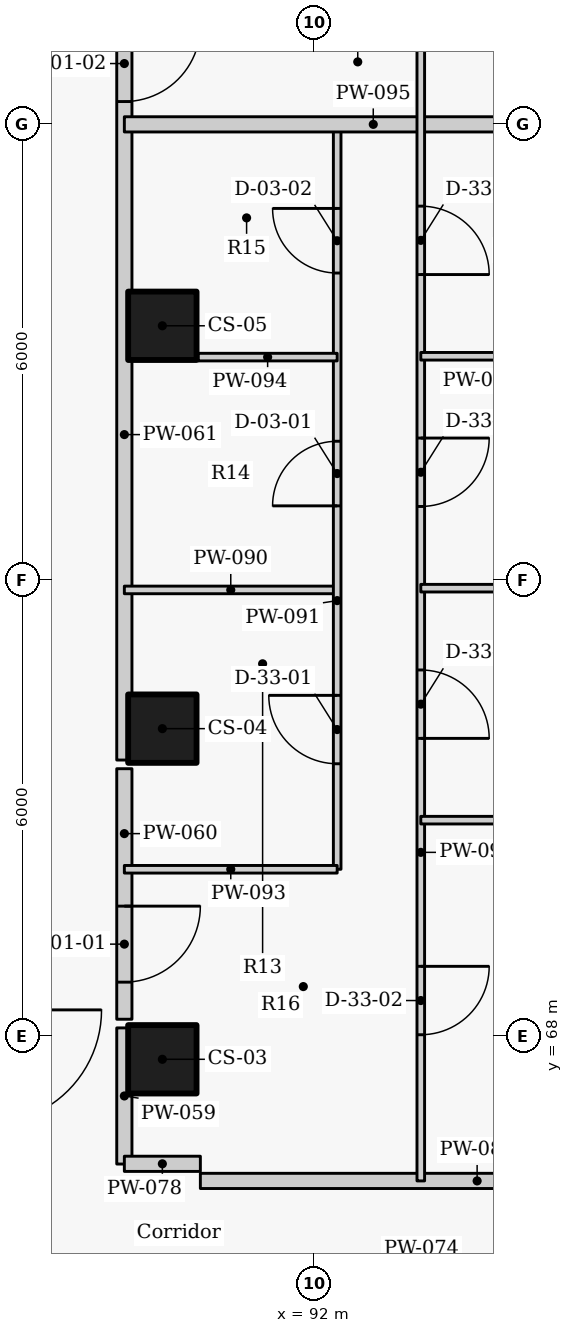
"""IFC4 building model, lengths in metres.
Left out: names, types, materials, properties, quantities, classifications, styles, units other than length and angle.
Written with IfcOpenShell. Run it as: python <this file> out.ifc"""

import sys

from ifc_helpers import new_model, si_unit, direction, frame, frame_2d, origin, origin_2d, place, context, subcontext, project, spatial, rectangle, extrude, element, fill, save


model = new_model("IFC4")
c1 = context("Model", 3, precision=1e-05, world=origin(), true_north=direction((0.0, 1.0)))
c2 = subcontext(c1, "Body", "Model", "MODEL_VIEW")
j1 = project(units=[si_unit("LENGTHUNIT", "METRE"), si_unit("PLANEANGLEUNIT", "RADIAN")], contexts=[c1])
p1 = place(None, origin())
s1 = spatial("IfcSite", under=j1, at=p1, CompositionType="ELEMENT")
p2 = place(p1, origin())
s2 = spatial("IfcBuilding", under=s1, at=p2, CompositionType="ELEMENT")
p3 = place(p2, frame((0.0, 0.0, 229.5)))
s3 = spatial("IfcBuildingStorey", under=s2, at=p3, CompositionType="ELEMENT", Elevation=229.5)
for number, where, z_axis, x_axis in (
    (1, (90.0, 67.7, 0.0), (0.0, 0.0, 1.0), (0.0, 1.0, 0.0)),
    (2, (90.0, 72.05, 0.0), (0.0, 0.0, 1.0), (0.0, 1.0, 0.0)),
    (3, (90.0, 77.35, 0.0), (0.0, 0.0, 1.0), (0.0, 1.0, 0.0)),
):
    element("IfcColumn", number, at=place(p3, frame(where, z_axis=z_axis, x_axis=x_axis)), inside=s3, PredefinedType="COLUMN", context=c2, shape_type="SweptSolid", body=[
        extrude(rectangle(XDim=0.9, YDim=0.9, at=origin_2d()), origin(), (0.0, 0.0, 1.0), 3.3),
    ])
p4 = place(p3, frame((89.5, 66.322, 0.0), z_axis=(0.0, 0.0, 1.0), x_axis=(0.0, 1.0, 0.0)))
e4 = element("IfcWall", 4, at=p4, inside=s3, PredefinedType="PARTITIONING", context=c2, shape_type="SweptSolid", body=[
    extrude(rectangle(XDim=1.791, YDim=0.2, at=frame_2d((0.896, 0.0))), origin(), (0.0, 0.0, 1.0), 3.025),
])
p5 = place(p3, frame((89.5, 71.523, 0.0), z_axis=(0.0, 0.0, 1.0), x_axis=(0.0, -1.0, 0.0)))
e5 = element("IfcWall", 5, at=p5, inside=s3, PredefinedType="PARTITIONING", context=c2, shape_type="SweptSolid", body=[
    extrude(rectangle(XDim=3.296, YDim=0.2, at=frame_2d((1.648, 0.0))), origin(), (0.0, 0.0, 1.0), 3.025),
])
p6 = place(p5, frame((1.808, 0.0, 0.0)))
e6 = element("IfcOpeningElement", 6, at=p6, cuts=e5, PredefinedType="OPENING", context=c2, shape_type="SweptSolid", body=[
    extrude(rectangle(XDim=1.0, YDim=2.1, at=frame_2d((0.5, 1.05))), frame((0.0, 0.11, 0.0), z_axis=(0.0, -1.0, 0.0), x_axis=(1.0, 0.0, 0.0)), (0.0, 0.0, 1.0), 0.22),
])
p7 = place(p3, frame((89.5, 82.123, 0.0), z_axis=(0.0, 0.0, 1.0), x_axis=(0.0, -1.0, 0.0)))
e7 = element("IfcWall", 7, at=p7, inside=s3, PredefinedType="PARTITIONING", context=c2, shape_type="SweptSolid", body=[
    extrude(rectangle(XDim=10.486, YDim=0.2, at=frame_2d((5.243, 0.0))), origin(), (0.0, 0.0, 1.0), 3.025),
])
p8 = place(p7, frame((0.823, 0.0, 0.0)))
e8 = element("IfcOpeningElement", 8, at=p8, cuts=e7, PredefinedType="OPENING", context=c2, shape_type="SweptSolid", body=[
    extrude(rectangle(XDim=1.0, YDim=2.1, at=frame_2d((0.5, 1.05))), frame((0.0, 0.11, 0.0), z_axis=(0.0, -1.0, 0.0), x_axis=(1.0, 0.0, 0.0)), (0.0, 0.0, 1.0), 0.22),
])
p9 = place(p3, frame((89.5, 66.325, 0.0), z_axis=(0.0, 0.0, 1.0), x_axis=(1.0, 0.0, 0.0)))
e9 = element("IfcWall", 9, at=p9, inside=s3, PredefinedType="PARTITIONING", context=c2, shape_type="SweptSolid", body=[
    extrude(rectangle(XDim=1.0, YDim=0.2, at=frame_2d((0.5, 0.0))), origin(), (0.0, 0.0, 1.0), 2.505),
])
p10 = place(p3, frame((90.5, 66.1, 0.0), z_axis=(0.0, 0.0, 1.0), x_axis=(1.0, 0.0, 0.0)))
e10 = element("IfcWall", 10, at=p10, inside=s3, PredefinedType="PARTITIONING", context=c2, shape_type="SweptSolid", body=[
    extrude(rectangle(XDim=7.282, YDim=0.2, at=frame_2d((3.641, 0.0))), origin(), (0.0, 0.0, 1.0), 2.405),
])
p11 = place(p3, frame((89.5, 73.875, 0.0), z_axis=(0.0, 0.0, 1.0), x_axis=(1.0, 0.0, 0.0)))
e11 = element("IfcWall", 11, at=p11, inside=s3, PredefinedType="PARTITIONING", context=c2, shape_type="SweptSolid", body=[
    extrude(rectangle(XDim=2.8, YDim=0.1, at=frame_2d((1.4, 0.0))), origin(), (0.0, 0.0, 1.0), 2.505),
])
p12 = place(p3, frame((92.3, 70.2, 0.0), z_axis=(0.0, 0.0, 1.0), x_axis=(0.0, 1.0, 0.0)))
e12 = element("IfcWall", 12, at=p12, inside=s3, PredefinedType="PARTITIONING", context=c2, shape_type="SweptSolid", body=[
    extrude(rectangle(XDim=9.8, YDim=0.1, at=frame_2d((4.9, 0.0))), origin(), (0.0, 0.0, 1.0), 3.025),
])
p13 = place(p12, frame((1.388, 0.0, 0.0)))
e13 = element("IfcOpeningElement", 13, at=p13, cuts=e12, PredefinedType="OPENING", context=c2, shape_type="SweptSolid", body=[
    extrude(rectangle(XDim=0.9, YDim=2.1, at=frame_2d((0.45, 1.05))), frame((0.0, 0.06, 0.0), z_axis=(0.0, -1.0, 0.0), x_axis=(1.0, 0.0, 0.0)), (0.0, 0.0, 1.0), 0.12),
])
p14 = place(p12, frame((4.781, 0.0, 0.0)))
e14 = element("IfcOpeningElement", 14, at=p14, cuts=e12, PredefinedType="OPENING", context=c2, shape_type="SweptSolid", body=[
    extrude(rectangle(XDim=0.85, YDim=2.1, at=frame_2d((0.425, 1.05))), frame((0.0, 0.06, 0.0), z_axis=(0.0, -1.0, 0.0), x_axis=(1.0, 0.0, 0.0)), (0.0, 0.0, 1.0), 0.12),
])
p15 = place(p12, frame((7.844, 0.0, 0.0)))
e15 = element("IfcOpeningElement", 15, at=p15, cuts=e12, PredefinedType="OPENING", context=c2, shape_type="SweptSolid", body=[
    extrude(rectangle(XDim=0.85, YDim=2.1, at=frame_2d((0.425, 1.05))), frame((0.0, 0.06, 0.0), z_axis=(0.0, -1.0, 0.0), x_axis=(1.0, 0.0, 0.0)), (0.0, 0.0, 1.0), 0.12),
])
p16 = place(p3, frame((89.5, 70.2, 0.0), z_axis=(0.0, 0.0, 1.0), x_axis=(1.0, 0.0, 0.0)))
e16 = element("IfcWall", 16, at=p16, inside=s3, PredefinedType="PARTITIONING", context=c2, shape_type="SweptSolid", body=[
    extrude(rectangle(XDim=2.8, YDim=0.1, at=frame_2d((1.4, 0.0))), origin(), (0.0, 0.0, 1.0), 2.505),
])
p17 = place(p3, frame((90.47, 76.938, 0.0), z_axis=(0.0, 0.0, 1.0), x_axis=(1.0, 0.0, 0.0)))
e17 = element("IfcWall", 17, at=p17, inside=s3, PredefinedType="PARTITIONING", context=c2, shape_type="SweptSolid", body=[
    extrude(rectangle(XDim=1.83, YDim=0.1, at=frame_2d((0.915, 0.0))), origin(), (0.0, 0.0, 1.0), 3.025),
])
p18 = place(p3, frame((89.5, 80.0, 0.0), z_axis=(0.0, 0.0, 1.0), x_axis=(1.0, 0.0, 0.0)))
e18 = element("IfcWall", 18, at=p18, inside=s3, PredefinedType="PARTITIONING", context=c2, shape_type="SweptSolid", body=[
    extrude(rectangle(XDim=6.55, YDim=0.2, at=frame_2d((3.275, 0.0))), origin(), (0.0, 0.0, 1.0), 2.405),
])
p19 = place(p3, frame((93.4, 92.85, 0.0), z_axis=(0.0, 0.0, 1.0), x_axis=(0.0, -1.0, 0.0)))
e19 = element("IfcWall", 19, at=p19, inside=s3, PredefinedType="PARTITIONING", context=c2, shape_type="SweptSolid", body=[
    extrude(rectangle(XDim=26.75, YDim=0.1, at=frame_2d((13.375, 0.0))), origin(), (0.0, 0.0, 1.0), 3.025),
])
p20 = place(p19, frame((23.927, 0.0, 0.0)))
e20 = element("IfcOpeningElement", 20, at=p20, cuts=e19, PredefinedType="OPENING", context=c2, shape_type="SweptSolid", body=[
    extrude(rectangle(XDim=0.9, YDim=2.1, at=frame_2d((0.45, 1.05))), frame((0.0, 0.06, 0.0), z_axis=(0.0, -1.0, 0.0), x_axis=(1.0, 0.0, 0.0)), (0.0, 0.0, 1.0), 0.12),
])
p21 = place(p19, frame((20.028, 0.0, 0.0)))
e21 = element("IfcOpeningElement", 21, at=p21, cuts=e19, PredefinedType="OPENING", context=c2, shape_type="SweptSolid", body=[
    extrude(rectangle(XDim=0.9, YDim=2.1, at=frame_2d((0.45, 1.05))), frame((0.0, 0.06, 0.0), z_axis=(0.0, -1.0, 0.0), x_axis=(1.0, 0.0, 0.0)), (0.0, 0.0, 1.0), 0.12),
])
p22 = place(p19, frame((16.977, 0.0, 0.0)))
e22 = element("IfcOpeningElement", 22, at=p22, cuts=e19, PredefinedType="OPENING", context=c2, shape_type="SweptSolid", body=[
    extrude(rectangle(XDim=0.9, YDim=2.1, at=frame_2d((0.45, 1.05))), frame((0.0, 0.06, 0.0), z_axis=(0.0, -1.0, 0.0), x_axis=(1.0, 0.0, 0.0)), (0.0, 0.0, 1.0), 0.12),
])
p23 = place(p19, frame((13.926, 0.0, 0.0)))
e23 = element("IfcOpeningElement", 23, at=p23, cuts=e19, PredefinedType="OPENING", context=c2, shape_type="SweptSolid", body=[
    extrude(rectangle(XDim=0.9, YDim=2.1, at=frame_2d((0.45, 1.05))), frame((0.0, 0.06, 0.0), z_axis=(0.0, -1.0, 0.0), x_axis=(1.0, 0.0, 0.0)), (0.0, 0.0, 1.0), 0.12),
])
p24 = place(p19, frame((10.206, 0.0, 0.0)))
e24 = element("IfcOpeningElement", 24, at=p24, cuts=e19, PredefinedType="OPENING", context=c2, shape_type="SweptSolid", body=[
    extrude(rectangle(XDim=0.9, YDim=2.1, at=frame_2d((0.45, 1.05))), frame((0.0, 0.06, 0.0), z_axis=(0.0, -1.0, 0.0), x_axis=(1.0, 0.0, 0.0)), (0.0, 0.0, 1.0), 0.12),
])
p25 = place(p19, frame((6.602, 0.0, 0.0)))
e25 = element("IfcOpeningElement", 25, at=p25, cuts=e19, PredefinedType="OPENING", context=c2, shape_type="SweptSolid", body=[
    extrude(rectangle(XDim=0.9, YDim=2.1, at=frame_2d((0.45, 1.05))), frame((0.0, 0.06, 0.0), z_axis=(0.0, -1.0, 0.0), x_axis=(1.0, 0.0, 0.0)), (0.0, 0.0, 1.0), 0.12),
])
p26 = place(p19, frame((3.781, 0.0, 0.0)))
e26 = element("IfcOpeningElement", 26, at=p26, cuts=e19, PredefinedType="OPENING", context=c2, shape_type="SweptSolid", body=[
    extrude(rectangle(XDim=0.9, YDim=2.1, at=frame_2d((0.45, 1.05))), frame((0.0, 0.06, 0.0), z_axis=(0.0, -1.0, 0.0), x_axis=(1.0, 0.0, 0.0)), (0.0, 0.0, 1.0), 0.12),
])
p27 = place(p19, frame((0.96, 0.0, 0.0)))
e27 = element("IfcOpeningElement", 27, at=p27, cuts=e19, PredefinedType="OPENING", context=c2, shape_type="SweptSolid", body=[
    extrude(rectangle(XDim=0.9, YDim=2.1, at=frame_2d((0.45, 1.05))), frame((0.0, 0.06, 0.0), z_axis=(0.0, -1.0, 0.0), x_axis=(1.0, 0.0, 0.0)), (0.0, 0.0, 1.0), 0.12),
])
p28 = place(p3, frame((93.4, 70.846, 0.0), z_axis=(0.0, 0.0, 1.0), x_axis=(1.0, 0.0, 0.0)))
e28 = element("IfcWall", 28, at=p28, inside=s3, PredefinedType="PARTITIONING", context=c2, shape_type="SweptSolid", body=[
    extrude(rectangle(XDim=7.123, YDim=0.1, at=frame_2d((3.562, 0.0))), origin(), (0.0, 0.0, 1.0), 2.405),
])
p29 = place(p3, frame((93.4, 73.898, 0.0), z_axis=(0.0, 0.0, 1.0), x_axis=(1.0, 0.0, 0.0)))
e29 = element("IfcWall", 29, at=p29, inside=s3, PredefinedType="PARTITIONING", context=c2, shape_type="SweptSolid", body=[
    extrude(rectangle(XDim=8.885, YDim=0.1, at=frame_2d((4.442, 0.0))), origin(), (0.0, 0.0, 1.0), 2.405),
])
p30 = place(p3, frame((93.4, 76.949, 0.0), z_axis=(0.0, 0.0, 1.0), x_axis=(1.0, 0.0, 0.0)))
e30 = element("IfcWall", 30, at=p30, inside=s3, PredefinedType="PARTITIONING", context=c2, shape_type="SweptSolid", body=[
    extrude(rectangle(XDim=2.03, YDim=0.1, at=frame_2d((1.015, 0.0))), origin(), (0.0, 0.0, 1.0), 3.025),
])
p31 = place(p6, origin())
e31 = element("IfcDoor", 31, at=p31, inside=s3, OperationType="SINGLE_SWING_LEFT", PredefinedType="DOOR", context=c2, shape_type="SweptSolid", body=[
    extrude(rectangle(XDim=1.0, YDim=2.1, at=frame_2d((0.5, 1.05))), frame((0.0, 0.025, 0.0), z_axis=(0.0, -1.0, 0.0), x_axis=(1.0, 0.0, 0.0)), (0.0, 0.0, 1.0), 0.05),
])
fill(e6, e31)
p32 = place(p13, origin())
e32 = element("IfcDoor", 32, at=p32, inside=s3, OperationType="SINGLE_SWING_RIGHT", PredefinedType="DOOR", context=c2, shape_type="SweptSolid", body=[
    extrude(rectangle(XDim=0.9, YDim=2.1, at=frame_2d((0.45, 1.05))), frame((0.0, 0.025, 0.0), z_axis=(0.0, -1.0, 0.0), x_axis=(1.0, 0.0, 0.0)), (0.0, 0.0, 1.0), 0.05),
])
fill(e13, e32)
p33 = place(p14, origin())
e33 = element("IfcDoor", 33, at=p33, inside=s3, OperationType="SINGLE_SWING_LEFT", PredefinedType="DOOR", context=c2, shape_type="SweptSolid", body=[
    extrude(rectangle(XDim=0.85, YDim=2.1, at=frame_2d((0.425, 1.05))), frame((0.0, 0.025, 0.0), z_axis=(0.0, -1.0, 0.0), x_axis=(1.0, 0.0, 0.0)), (0.0, 0.0, 1.0), 0.05),
])
fill(e14, e33)
p34 = place(p15, origin())
e34 = element("IfcDoor", 34, at=p34, inside=s3, OperationType="SINGLE_SWING_RIGHT", PredefinedType="DOOR", context=c2, shape_type="SweptSolid", body=[
    extrude(rectangle(XDim=0.85, YDim=2.1, at=frame_2d((0.425, 1.05))), frame((0.0, 0.025, 0.0), z_axis=(0.0, -1.0, 0.0), x_axis=(1.0, 0.0, 0.0)), (0.0, 0.0, 1.0), 0.05),
])
fill(e15, e34)
p35 = place(p20, origin())
e35 = element("IfcDoor", 35, at=p35, inside=s3, OperationType="SINGLE_SWING_LEFT", PredefinedType="DOOR", context=c2, shape_type="SweptSolid", body=[
    extrude(rectangle(XDim=0.9, YDim=2.1, at=frame_2d((0.45, 1.05))), frame((0.0, 0.025, 0.0), z_axis=(0.0, -1.0, 0.0), x_axis=(1.0, 0.0, 0.0)), (0.0, 0.0, 1.0), 0.05),
])
fill(e20, e35)
p36 = place(p21, origin())
e36 = element("IfcDoor", 36, at=p36, inside=s3, OperationType="SINGLE_SWING_RIGHT", PredefinedType="DOOR", context=c2, shape_type="SweptSolid", body=[
    extrude(rectangle(XDim=0.9, YDim=2.1, at=frame_2d((0.45, 1.05))), frame((0.0, 0.025, 0.0), z_axis=(0.0, -1.0, 0.0), x_axis=(1.0, 0.0, 0.0)), (0.0, 0.0, 1.0), 0.05),
])
fill(e21, e36)
p37 = place(p22, origin())
e37 = element("IfcDoor", 37, at=p37, inside=s3, OperationType="SINGLE_SWING_LEFT", PredefinedType="DOOR", context=c2, shape_type="SweptSolid", body=[
    extrude(rectangle(XDim=0.9, YDim=2.1, at=frame_2d((0.45, 1.05))), frame((0.0, 0.025, 0.0), z_axis=(0.0, -1.0, 0.0), x_axis=(1.0, 0.0, 0.0)), (0.0, 0.0, 1.0), 0.05),
])
fill(e22, e37)
p38 = place(p23, origin())
e38 = element("IfcDoor", 38, at=p38, inside=s3, OperationType="SINGLE_SWING_RIGHT", PredefinedType="DOOR", context=c2, shape_type="SweptSolid", body=[
    extrude(rectangle(XDim=0.9, YDim=2.1, at=frame_2d((0.45, 1.05))), frame((0.0, 0.025, 0.0), z_axis=(0.0, -1.0, 0.0), x_axis=(1.0, 0.0, 0.0)), (0.0, 0.0, 1.0), 0.05),
])
fill(e23, e38)
p39 = place(p8, origin())
e39 = element("IfcDoor", 39, at=p39, inside=s3, OperationType="SINGLE_SWING_LEFT", PredefinedType="DOOR", context=c2, shape_type="SweptSolid", body=[
    extrude(rectangle(XDim=1.0, YDim=2.1, at=frame_2d((0.5, 1.05))), frame((0.0, 0.025, 0.0), z_axis=(0.0, -1.0, 0.0), x_axis=(1.0, 0.0, 0.0)), (0.0, 0.0, 1.0), 0.05),
])
fill(e8, e39)
save(model, sys.argv[1])
